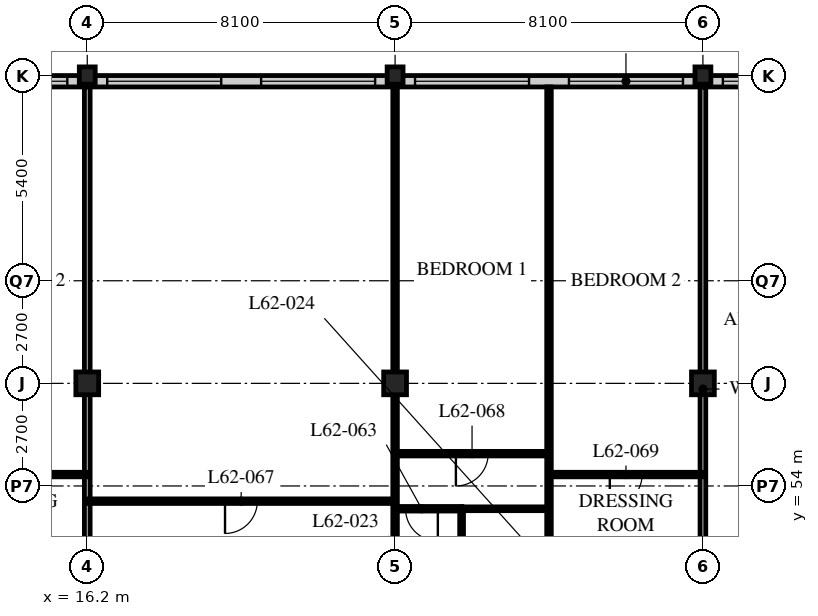
"""IFC4 building model, lengths in metres.
Left out: names, types, materials, properties, quantities, classifications, styles, units other than length and angle.
Written with IfcOpenShell. Run it as: python <this file> out.ifc"""

import sys

from ifc_helpers import new_model, si_unit, direction, frame, frame_2d, origin, origin_2d, place, context, subcontext, project, spatial, rectangle, hollow_rectangle, i_section, extrude, element, fill, save


model = new_model("IFC4")
c1 = context("Model", 3, precision=1e-05, world=origin(), true_north=direction((0.0, 1.0)))
c2 = subcontext(c1, "Body", "Model", "MODEL_VIEW")
j1 = project(units=[si_unit("LENGTHUNIT", "METRE"), si_unit("PLANEANGLEUNIT", "RADIAN")], contexts=[c1])
p1 = place(None, origin())
s1 = spatial("IfcSite", under=j1, at=p1, CompositionType="ELEMENT")
p2 = place(p1, origin())
s2 = spatial("IfcBuilding", under=s1, at=p2, CompositionType="ELEMENT")
p3 = place(p2, frame((0.0, 0.0, 242.4)))
s3 = spatial("IfcBuildingStorey", under=s2, at=p3, CompositionType="ELEMENT", Elevation=242.4)
p4 = place(p3, frame((16.2, 56.7, 0.0), z_axis=(0.0, 0.0, 1.0), x_axis=(1.0, 0.0, 0.0)))
e1 = element("IfcColumn", 1, at=p4, inside=s3, PredefinedType="COLUMN", context=c2, shape_type="SweptSolid", body=[
    extrude(hollow_rectangle(XDim=0.6, YDim=0.6, WallThickness=0.05, at=origin_2d()), origin(), (0.0, 0.0, 1.0), 3.9),
])
p5 = place(p3, frame((16.2, 64.8, 0.0), z_axis=(0.0, 0.0, 1.0), x_axis=(1.0, 0.0, 0.0)))
e2 = element("IfcColumn", 2, at=p5, inside=s3, PredefinedType="COLUMN", context=c2, shape_type="SweptSolid", body=[
    extrude(i_section(OverallWidth=0.418, OverallDepth=0.456, WebThickness=0.042, FlangeThickness=0.067, FilletRadius=0.015, at=origin_2d()), origin(), (0.0, 0.0, 1.0), 3.9),
])
p6 = place(p3, frame((24.3, 56.7, 0.0), z_axis=(0.0, 0.0, 1.0), x_axis=(1.0, 0.0, 0.0)))
e3 = element("IfcColumn", 3, at=p6, inside=s3, PredefinedType="COLUMN", context=c2, shape_type="SweptSolid", body=[
    extrude(hollow_rectangle(XDim=0.6, YDim=0.6, WallThickness=0.05, at=origin_2d()), origin(), (0.0, 0.0, 1.0), 3.9),
])
p7 = place(p3, frame((24.3, 64.8, 0.0), z_axis=(0.0, 0.0, 1.0), x_axis=(1.0, 0.0, 0.0)))
e4 = element("IfcColumn", 4, at=p7, inside=s3, PredefinedType="COLUMN", context=c2, shape_type="SweptSolid", body=[
    extrude(i_section(OverallWidth=0.418, OverallDepth=0.456, WebThickness=0.042, FlangeThickness=0.067, FilletRadius=0.015, at=origin_2d()), origin(), (0.0, 0.0, 1.0), 3.9),
])
p8 = place(p3, frame((32.4, 56.7, 0.0), z_axis=(0.0, 0.0, 1.0), x_axis=(1.0, 0.0, 0.0)))
e5 = element("IfcColumn", 5, at=p8, inside=s3, PredefinedType="COLUMN", context=c2, shape_type="SweptSolid", body=[
    extrude(hollow_rectangle(XDim=0.6, YDim=0.6, WallThickness=0.05, at=origin_2d()), origin(), (0.0, 0.0, 1.0), 3.9),
])
p9 = place(p3, frame((32.4, 64.8, 0.0), z_axis=(0.0, 0.0, 1.0), x_axis=(1.0, 0.0, 0.0)))
e6 = element("IfcColumn", 6, at=p9, inside=s3, PredefinedType="COLUMN", context=c2, shape_type="SweptSolid", body=[
    extrude(i_section(OverallWidth=0.418, OverallDepth=0.456, WebThickness=0.042, FlangeThickness=0.067, FilletRadius=0.015, at=origin_2d()), origin(), (0.0, 0.0, 1.0), 3.9),
])
p10 = place(p3, frame((48.3, 64.65, 0.0), z_axis=(0.0, 0.0, 1.0), x_axis=(-1.0, 0.0, 0.0)))
e7 = element("IfcWall", 7, at=p10, inside=s3, PredefinedType="SOLIDWALL", context=c2, shape_type="SweptSolid", body=[
    extrude(rectangle(XDim=40.2, YDim=0.3, at=frame_2d((20.1, 0.0))), origin(), (0.0, 0.0, 1.0), 3.69),
])
p11 = place(p10, frame((0.225, 0.0, 0.6)))
e8 = element("IfcOpeningElement", 8, at=p11, cuts=e7, PredefinedType="OPENING", context=c2, shape_type="SweptSolid", body=[
    extrude(rectangle(XDim=3.0, YDim=2.3, at=frame_2d((1.5, 1.15))), frame((0.0, 0.16, 0.0), z_axis=(0.0, -1.0, 0.0), x_axis=(1.0, 0.0, 0.0)), (0.0, 0.0, 1.0), 0.32),
])
p12 = place(p10, frame((4.275, 0.0, 0.6)))
e9 = element("IfcOpeningElement", 9, at=p12, cuts=e7, PredefinedType="OPENING", context=c2, shape_type="SweptSolid", body=[
    extrude(rectangle(XDim=3.0, YDim=2.3, at=frame_2d((1.5, 1.15))), frame((0.0, 0.16, 0.0), z_axis=(0.0, -1.0, 0.0), x_axis=(1.0, 0.0, 0.0)), (0.0, 0.0, 1.0), 0.32),
])
p13 = place(p10, frame((8.325, 0.0, 0.6)))
e10 = element("IfcOpeningElement", 10, at=p13, cuts=e7, PredefinedType="OPENING", context=c2, shape_type="SweptSolid", body=[
    extrude(rectangle(XDim=3.0, YDim=2.3, at=frame_2d((1.5, 1.15))), frame((0.0, 0.16, 0.0), z_axis=(0.0, -1.0, 0.0), x_axis=(1.0, 0.0, 0.0)), (0.0, 0.0, 1.0), 0.32),
])
p14 = place(p10, frame((12.375, 0.0, 0.6)))
e11 = element("IfcOpeningElement", 11, at=p14, cuts=e7, PredefinedType="OPENING", context=c2, shape_type="SweptSolid", body=[
    extrude(rectangle(XDim=3.0, YDim=2.3, at=frame_2d((1.5, 1.15))), frame((0.0, 0.16, 0.0), z_axis=(0.0, -1.0, 0.0), x_axis=(1.0, 0.0, 0.0)), (0.0, 0.0, 1.0), 0.32),
])
p15 = place(p10, frame((16.425, 0.0, 0.6)))
e12 = element("IfcOpeningElement", 12, at=p15, cuts=e7, PredefinedType="OPENING", context=c2, shape_type="SweptSolid", body=[
    extrude(rectangle(XDim=3.0, YDim=2.3, at=frame_2d((1.5, 1.15))), frame((0.0, 0.16, 0.0), z_axis=(0.0, -1.0, 0.0), x_axis=(1.0, 0.0, 0.0)), (0.0, 0.0, 1.0), 0.32),
])
p16 = place(p10, frame((20.475, 0.0, 0.6)))
e13 = element("IfcOpeningElement", 13, at=p16, cuts=e7, PredefinedType="OPENING", context=c2, shape_type="SweptSolid", body=[
    extrude(rectangle(XDim=3.0, YDim=2.3, at=frame_2d((1.5, 1.15))), frame((0.0, 0.16, 0.0), z_axis=(0.0, -1.0, 0.0), x_axis=(1.0, 0.0, 0.0)), (0.0, 0.0, 1.0), 0.32),
])
p17 = place(p10, frame((24.525, 0.0, 0.6)))
e14 = element("IfcOpeningElement", 14, at=p17, cuts=e7, PredefinedType="OPENING", context=c2, shape_type="SweptSolid", body=[
    extrude(rectangle(XDim=3.0, YDim=2.3, at=frame_2d((1.5, 1.15))), frame((0.0, 0.16, 0.0), z_axis=(0.0, -1.0, 0.0), x_axis=(1.0, 0.0, 0.0)), (0.0, 0.0, 1.0), 0.32),
])
p18 = place(p10, frame((28.575, 0.0, 0.6)))
e15 = element("IfcOpeningElement", 15, at=p18, cuts=e7, PredefinedType="OPENING", context=c2, shape_type="SweptSolid", body=[
    extrude(rectangle(XDim=3.0, YDim=2.3, at=frame_2d((1.5, 1.15))), frame((0.0, 0.16, 0.0), z_axis=(0.0, -1.0, 0.0), x_axis=(1.0, 0.0, 0.0)), (0.0, 0.0, 1.0), 0.32),
])
p19 = place(p10, frame((32.625, 0.0, 0.6)))
e16 = element("IfcOpeningElement", 16, at=p19, cuts=e7, PredefinedType="OPENING", context=c2, shape_type="SweptSolid", body=[
    extrude(rectangle(XDim=3.0, YDim=2.3, at=frame_2d((1.5, 1.15))), frame((0.0, 0.16, 0.0), z_axis=(0.0, -1.0, 0.0), x_axis=(1.0, 0.0, 0.0)), (0.0, 0.0, 1.0), 0.32),
])
p20 = place(p10, frame((36.675, 0.0, 0.6)))
e17 = element("IfcOpeningElement", 17, at=p20, cuts=e7, PredefinedType="OPENING", context=c2, shape_type="SweptSolid", body=[
    extrude(rectangle(XDim=3.0, YDim=2.3, at=frame_2d((1.5, 1.15))), frame((0.0, 0.16, 0.0), z_axis=(0.0, -1.0, 0.0), x_axis=(1.0, 0.0, 0.0)), (0.0, 0.0, 1.0), 0.32),
])
p21 = place(p3, frame((26.05, 51.0, 0.0), z_axis=(0.0, 0.0, 1.0), x_axis=(0.0, 1.0, 0.0)))
e18 = element("IfcWall", 18, at=p21, inside=s3, PredefinedType="PARTITIONING", context=c2, shape_type="SweptSolid", body=[
    extrude(rectangle(XDim=2.4, YDim=0.1, at=frame_2d((1.2, 0.0))), origin(), (0.0, 0.0, 1.0), 3.69),
])
p22 = place(p21, frame((0.8, 0.0, 0.0)))
e19 = element("IfcOpeningElement", 19, at=p22, cuts=e18, PredefinedType="OPENING", context=c2, shape_type="SweptSolid", body=[
    extrude(rectangle(XDim=0.8, YDim=2.1, at=frame_2d((0.4, 1.05))), frame((0.0, 0.06, 0.0), z_axis=(0.0, -1.0, 0.0), x_axis=(1.0, 0.0, 0.0)), (0.0, 0.0, 1.0), 0.12),
])
p23 = place(p3, frame((26.05, 53.4, 0.0), z_axis=(0.0, 0.0, 1.0), x_axis=(1.0, 0.0, 0.0)))
e20 = element("IfcWall", 20, at=p23, inside=s3, PredefinedType="PARTITIONING", context=c2, shape_type="SweptSolid", body=[
    extrude(rectangle(XDim=2.3, YDim=0.1, at=frame_2d((1.15, 0.0))), origin(), (0.0, 0.0, 1.0), 3.69),
])
p24 = place(p3, frame((24.3, 51.0, 0.0), z_axis=(0.0, 0.0, 1.0), x_axis=(0.0, 1.0, 0.0)))
e21 = element("IfcWall", 21, at=p24, inside=s3, PredefinedType="PARTITIONING", context=c2, shape_type="SweptSolid", body=[
    extrude(rectangle(XDim=13.5, YDim=0.12, at=frame_2d((6.75, 0.0))), origin(), (0.0, 0.0, 1.0), 2.928),
])
p25 = place(p3, frame((28.35, 51.0, 0.0), z_axis=(0.0, 0.0, 1.0), x_axis=(0.0, 1.0, 0.0)))
e22 = element("IfcWall", 22, at=p25, inside=s3, PredefinedType="PARTITIONING", context=c2, shape_type="SweptSolid", body=[
    extrude(rectangle(XDim=13.5, YDim=0.12, at=frame_2d((6.75, 0.0))), origin(), (0.0, 0.0, 1.0), 3.69),
])
for number, where, z_axis, x_axis in (
    (23, (32.4, 48.6, 0.0), (0.0, 0.0, 1.0), (0.0, 1.0, 0.0)),
    (24, (16.2, 48.6, 0.0), (0.0, 0.0, 1.0), (0.0, 1.0, 0.0)),
):
    element("IfcWall", number, at=place(p3, frame(where, z_axis=z_axis, x_axis=x_axis)), inside=s3, PredefinedType="PARTITIONING", context=c2, shape_type="SweptSolid", body=[
        extrude(rectangle(XDim=15.9, YDim=0.15, at=frame_2d((7.95, 0.0))), origin(), (0.0, 0.0, 1.0), 2.928),
    ])
p26 = place(p3, frame((24.3, 53.4, 0.0), z_axis=(0.0, 0.0, 1.0), x_axis=(1.0, 0.0, 0.0)))
e25 = element("IfcWall", 25, at=p26, inside=s3, PredefinedType="PARTITIONING", context=c2, shape_type="SweptSolid", body=[
    extrude(rectangle(XDim=1.76, YDim=0.12, at=frame_2d((0.88, 0.0))), origin(), (0.0, 0.0, 1.0), 3.69),
])
p27 = place(p26, frame((0.275, 0.0, 0.0)))
e26 = element("IfcOpeningElement", 26, at=p27, cuts=e25, PredefinedType="OPENING", context=c2, shape_type="SweptSolid", body=[
    extrude(rectangle(XDim=0.85, YDim=2.1, at=frame_2d((0.425, 1.05))), frame((0.0, 0.07, 0.0), z_axis=(0.0, -1.0, 0.0), x_axis=(1.0, 0.0, 0.0)), (0.0, 0.0, 1.0), 0.14),
])
p28 = place(p3, frame((16.2, 53.6, 0.0), z_axis=(0.0, 0.0, 1.0), x_axis=(1.0, 0.0, 0.0)))
e27 = element("IfcWall", 27, at=p28, inside=s3, PredefinedType="PARTITIONING", context=c2, shape_type="SweptSolid", body=[
    extrude(rectangle(XDim=8.1, YDim=0.12, at=frame_2d((4.05, 0.0))), origin(), (0.0, 0.0, 1.0), 3.69),
])
p29 = place(p28, frame((3.625, 0.0, 0.0)))
e28 = element("IfcOpeningElement", 28, at=p29, cuts=e27, PredefinedType="OPENING", context=c2, shape_type="SweptSolid", body=[
    extrude(rectangle(XDim=0.85, YDim=2.1, at=frame_2d((0.425, 1.05))), frame((0.0, 0.07, 0.0), z_axis=(0.0, -1.0, 0.0), x_axis=(1.0, 0.0, 0.0)), (0.0, 0.0, 1.0), 0.14),
])
p30 = place(p3, frame((24.3, 54.85, 0.0), z_axis=(0.0, 0.0, 1.0), x_axis=(1.0, 0.0, 0.0)))
e29 = element("IfcWall", 29, at=p30, inside=s3, PredefinedType="PARTITIONING", context=c2, shape_type="SweptSolid", body=[
    extrude(rectangle(XDim=4.05, YDim=0.12, at=frame_2d((2.025, 0.0))), origin(), (0.0, 0.0, 1.0), 3.69),
])
p31 = place(p30, frame((1.6, 0.0, 0.0)))
e30 = element("IfcOpeningElement", 30, at=p31, cuts=e29, PredefinedType="OPENING", context=c2, shape_type="SweptSolid", body=[
    extrude(rectangle(XDim=0.85, YDim=2.1, at=frame_2d((0.425, 1.05))), frame((0.0, 0.07, 0.0), z_axis=(0.0, -1.0, 0.0), x_axis=(1.0, 0.0, 0.0)), (0.0, 0.0, 1.0), 0.14),
])
p32 = place(p3, frame((28.35, 54.3, 0.0), z_axis=(0.0, 0.0, 1.0), x_axis=(1.0, 0.0, 0.0)))
e31 = element("IfcWall", 31, at=p32, inside=s3, PredefinedType="PARTITIONING", context=c2, shape_type="SweptSolid", body=[
    extrude(rectangle(XDim=4.05, YDim=0.12, at=frame_2d((2.025, 0.0))), origin(), (0.0, 0.0, 1.0), 3.69),
])
p33 = place(p32, frame((1.6, 0.0, 0.0)))
e32 = element("IfcOpeningElement", 32, at=p33, cuts=e31, PredefinedType="OPENING", context=c2, shape_type="SweptSolid", body=[
    extrude(rectangle(XDim=0.85, YDim=2.1, at=frame_2d((0.425, 1.05))), frame((0.0, 0.07, 0.0), z_axis=(0.0, -1.0, 0.0), x_axis=(1.0, 0.0, 0.0)), (0.0, 0.0, 1.0), 0.14),
])
p34 = place(p3, frame((12.15, 54.3, 0.0), z_axis=(0.0, 0.0, 1.0), x_axis=(1.0, 0.0, 0.0)))
e33 = element("IfcWall", 33, at=p34, inside=s3, PredefinedType="PARTITIONING", context=c2, shape_type="SweptSolid", body=[
    extrude(rectangle(XDim=4.05, YDim=0.12, at=frame_2d((2.025, 0.0))), origin(), (0.0, 0.0, 1.0), 3.69),
])
p35 = place(p34, frame((1.6, 0.0, 0.0)))
e34 = element("IfcOpeningElement", 34, at=p35, cuts=e33, PredefinedType="OPENING", context=c2, shape_type="SweptSolid", body=[
    extrude(rectangle(XDim=0.85, YDim=2.1, at=frame_2d((0.425, 1.05))), frame((0.0, 0.07, 0.0), z_axis=(0.0, -1.0, 0.0), x_axis=(1.0, 0.0, 0.0)), (0.0, 0.0, 1.0), 0.14),
])
p36 = place(p14, origin())
e35 = element("IfcWindow", 35, at=p36, inside=s3, PartitioningType="SINGLE_PANEL", PredefinedType="WINDOW", context=c2, shape_type="SweptSolid", body=[
    extrude(rectangle(XDim=3.0, YDim=2.3, at=frame_2d((1.5, 1.15))), frame((0.0, 0.03, 0.0), z_axis=(0.0, -1.0, 0.0), x_axis=(1.0, 0.0, 0.0)), (0.0, 0.0, 1.0), 0.06),
])
fill(e11, e35)
p37 = place(p15, origin())
e36 = element("IfcWindow", 36, at=p37, inside=s3, PartitioningType="SINGLE_PANEL", PredefinedType="WINDOW", context=c2, shape_type="SweptSolid", body=[
    extrude(rectangle(XDim=3.0, YDim=2.3, at=frame_2d((1.5, 1.15))), frame((0.0, 0.03, 0.0), z_axis=(0.0, -1.0, 0.0), x_axis=(1.0, 0.0, 0.0)), (0.0, 0.0, 1.0), 0.06),
])
fill(e12, e36)
p38 = place(p16, origin())
e37 = element("IfcWindow", 37, at=p38, inside=s3, PartitioningType="SINGLE_PANEL", PredefinedType="WINDOW", context=c2, shape_type="SweptSolid", body=[
    extrude(rectangle(XDim=3.0, YDim=2.3, at=frame_2d((1.5, 1.15))), frame((0.0, 0.03, 0.0), z_axis=(0.0, -1.0, 0.0), x_axis=(1.0, 0.0, 0.0)), (0.0, 0.0, 1.0), 0.06),
])
fill(e13, e37)
p39 = place(p17, origin())
e38 = element("IfcWindow", 38, at=p39, inside=s3, PartitioningType="SINGLE_PANEL", PredefinedType="WINDOW", context=c2, shape_type="SweptSolid", body=[
    extrude(rectangle(XDim=3.0, YDim=2.3, at=frame_2d((1.5, 1.15))), frame((0.0, 0.03, 0.0), z_axis=(0.0, -1.0, 0.0), x_axis=(1.0, 0.0, 0.0)), (0.0, 0.0, 1.0), 0.06),
])
fill(e14, e38)
p40 = place(p18, origin())
e39 = element("IfcWindow", 39, at=p40, inside=s3, PartitioningType="SINGLE_PANEL", PredefinedType="WINDOW", context=c2, shape_type="SweptSolid", body=[
    extrude(rectangle(XDim=3.0, YDim=2.3, at=frame_2d((1.5, 1.15))), frame((0.0, 0.03, 0.0), z_axis=(0.0, -1.0, 0.0), x_axis=(1.0, 0.0, 0.0)), (0.0, 0.0, 1.0), 0.06),
])
fill(e15, e39)
p41 = place(p19, origin())
e40 = element("IfcWindow", 40, at=p41, inside=s3, PartitioningType="SINGLE_PANEL", PredefinedType="WINDOW", context=c2, shape_type="SweptSolid", body=[
    extrude(rectangle(XDim=3.0, YDim=2.3, at=frame_2d((1.5, 1.15))), frame((0.0, 0.03, 0.0), z_axis=(0.0, -1.0, 0.0), x_axis=(1.0, 0.0, 0.0)), (0.0, 0.0, 1.0), 0.06),
])
fill(e16, e40)
p42 = place(p27, origin())
e41 = element("IfcDoor", 41, at=p42, inside=s3, OperationType="SINGLE_SWING_LEFT", PredefinedType="DOOR", context=c2, shape_type="SweptSolid", body=[
    extrude(rectangle(XDim=0.85, YDim=2.1, at=frame_2d((0.425, 1.05))), frame((0.0, 0.025, 0.0), z_axis=(0.0, -1.0, 0.0), x_axis=(1.0, 0.0, 0.0)), (0.0, 0.0, 1.0), 0.05),
])
fill(e26, e41)
p43 = place(p29, origin())
e42 = element("IfcDoor", 42, at=p43, inside=s3, OperationType="SINGLE_SWING_RIGHT", PredefinedType="DOOR", context=c2, shape_type="SweptSolid", body=[
    extrude(rectangle(XDim=0.85, YDim=2.1, at=frame_2d((0.425, 1.05))), frame((0.0, 0.025, 0.0), z_axis=(0.0, -1.0, 0.0), x_axis=(1.0, 0.0, 0.0)), (0.0, 0.0, 1.0), 0.05),
])
fill(e28, e42)
p44 = place(p31, origin())
e43 = element("IfcDoor", 43, at=p44, inside=s3, OperationType="SINGLE_SWING_RIGHT", PredefinedType="DOOR", context=c2, shape_type="SweptSolid", body=[
    extrude(rectangle(XDim=0.85, YDim=2.1, at=frame_2d((0.425, 1.05))), frame((0.0, 0.025, 0.0), z_axis=(0.0, -1.0, 0.0), x_axis=(1.0, 0.0, 0.0)), (0.0, 0.0, 1.0), 0.05),
])
fill(e30, e43)
p45 = place(p33, origin())
e44 = element("IfcDoor", 44, at=p45, inside=s3, OperationType="SINGLE_SWING_RIGHT", PredefinedType="DOOR", context=c2, shape_type="SweptSolid", body=[
    extrude(rectangle(XDim=0.85, YDim=2.1, at=frame_2d((0.425, 1.05))), frame((0.0, 0.025, 0.0), z_axis=(0.0, -1.0, 0.0), x_axis=(1.0, 0.0, 0.0)), (0.0, 0.0, 1.0), 0.05),
])
fill(e32, e44)
save(model, sys.argv[1])
